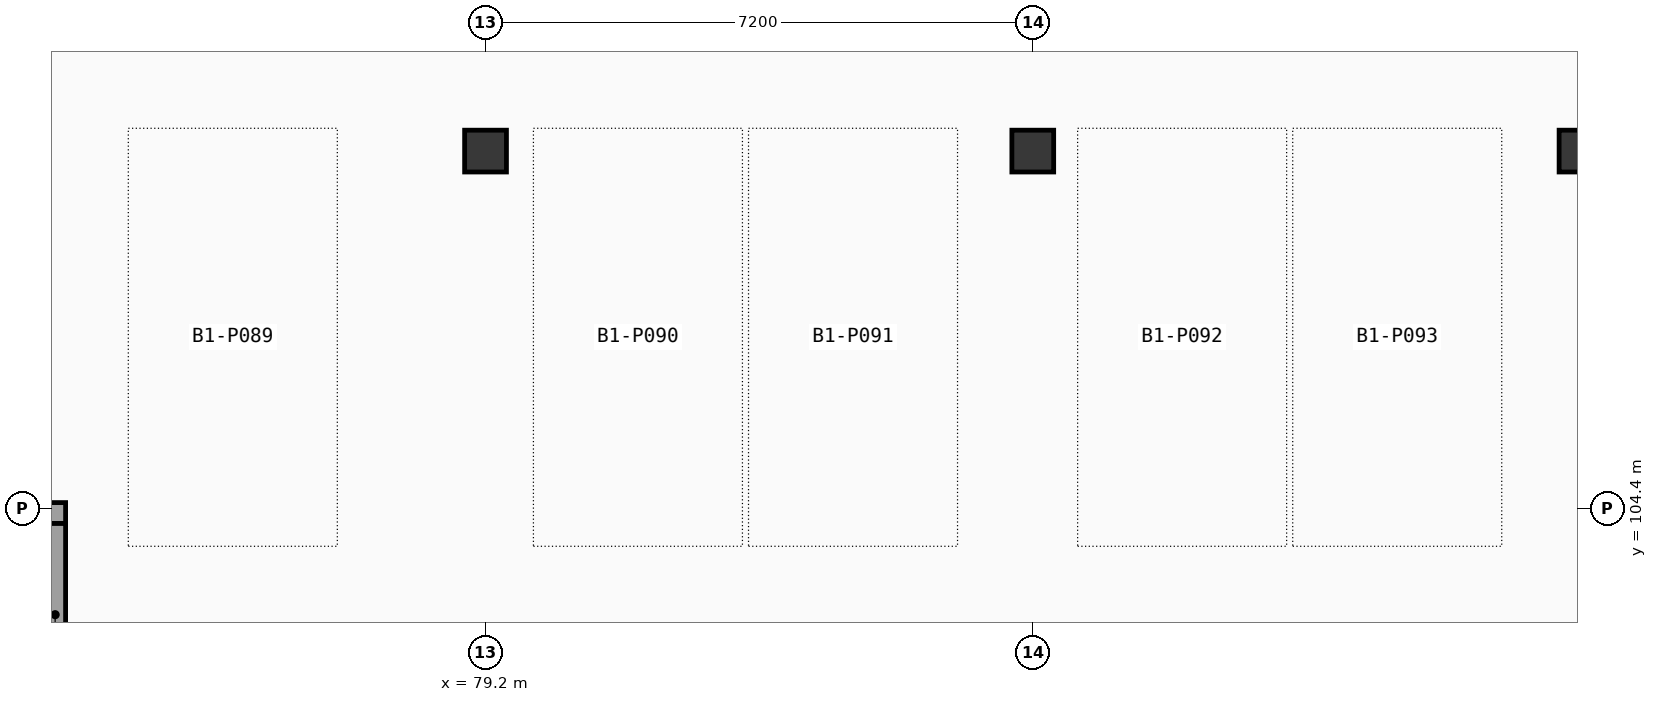
"""IFC4 building model, lengths in metres.
Left out: names, types, materials, properties, quantities, classifications, styles, units other than length and angle.
Written with IfcOpenShell. Run it as: python <this file> out.ifc"""

import sys

from ifc_helpers import new_model, si_unit, direction, frame, frame_2d, origin, origin_2d, place, context, subcontext, project, spatial, rectangle, extrude, element, save


model = new_model("IFC4")
c1 = context("Model", 3, precision=1e-05, world=origin(), true_north=direction((0.0, 1.0)))
c2 = subcontext(c1, "Body", "Model", "MODEL_VIEW")
j1 = project(units=[si_unit("LENGTHUNIT", "METRE"), si_unit("PLANEANGLEUNIT", "RADIAN")], contexts=[c1])
p1 = place(None, origin())
s1 = spatial("IfcSite", under=j1, at=p1, CompositionType="ELEMENT")
p2 = place(p1, origin())
s2 = spatial("IfcBuilding", under=s1, at=p2, CompositionType="ELEMENT")
p3 = place(p2, frame((0.0, 0.0, -4.2)))
s3 = spatial("IfcBuildingStorey", under=s2, at=p3, CompositionType="ELEMENT", Elevation=-4.2)
for number, where, z_axis, x_axis in (
    (1, (79.2, 109.1, 0.0), (0.0, 0.0, 1.0), (1.0, 0.0, 0.0)),
    (2, (86.4, 109.1, 0.0), (0.0, 0.0, 1.0), (1.0, 0.0, 0.0)),
    (3, (93.6, 109.1, 0.0), (0.0, 0.0, 1.0), (1.0, 0.0, 0.0)),
):
    element("IfcColumn", number, at=place(p3, frame(where, z_axis=z_axis, x_axis=x_axis)), inside=s3, PredefinedType="COLUMN", context=c2, shape_type="SweptSolid", body=[
        extrude(rectangle(XDim=0.55, YDim=0.55, at=origin_2d()), origin(), (0.0, 0.0, 1.0), 4.2),
    ])
p4 = place(p3, frame((71.525, 104.337, 0.0), z_axis=(0.0, 0.0, 1.0), x_axis=(1.0, 0.0, 0.0)))
e4 = element("IfcWall", 4, at=p4, inside=s3, PredefinedType="SHEAR", context=c2, shape_type="SweptSolid", body=[
    extrude(rectangle(XDim=2.15, YDim=0.275, at=frame_2d((1.075, 0.0))), origin(), (0.0, 0.0, 1.0), 3.92),
])
p5 = place(p4, frame((0.525, 0.0, 0.0)))
e5 = element("IfcOpeningElement", 5, at=p5, cuts=e4, PredefinedType="OPENING", context=c2, shape_type="SweptSolid", body=[
    extrude(rectangle(XDim=1.1, YDim=2.15, at=frame_2d((0.55, 1.075))), frame((0.0, 0.147, 0.0), z_axis=(0.0, -1.0, 0.0), x_axis=(1.0, 0.0, 0.0)), (0.0, 0.0, 1.0), 0.295),
])
p6 = place(p3, frame((73.538, 101.8, 0.0), z_axis=(0.0, 0.0, 1.0), x_axis=(0.0, 1.0, 0.0)))
e6 = element("IfcWall", 6, at=p6, inside=s3, PredefinedType="SHEAR", context=c2, shape_type="SweptSolid", body=[
    extrude(rectangle(XDim=2.4, YDim=0.275, at=frame_2d((1.2, 0.0))), origin(), (0.0, 0.0, 1.0), 3.92),
])
save(model, sys.argv[1])
